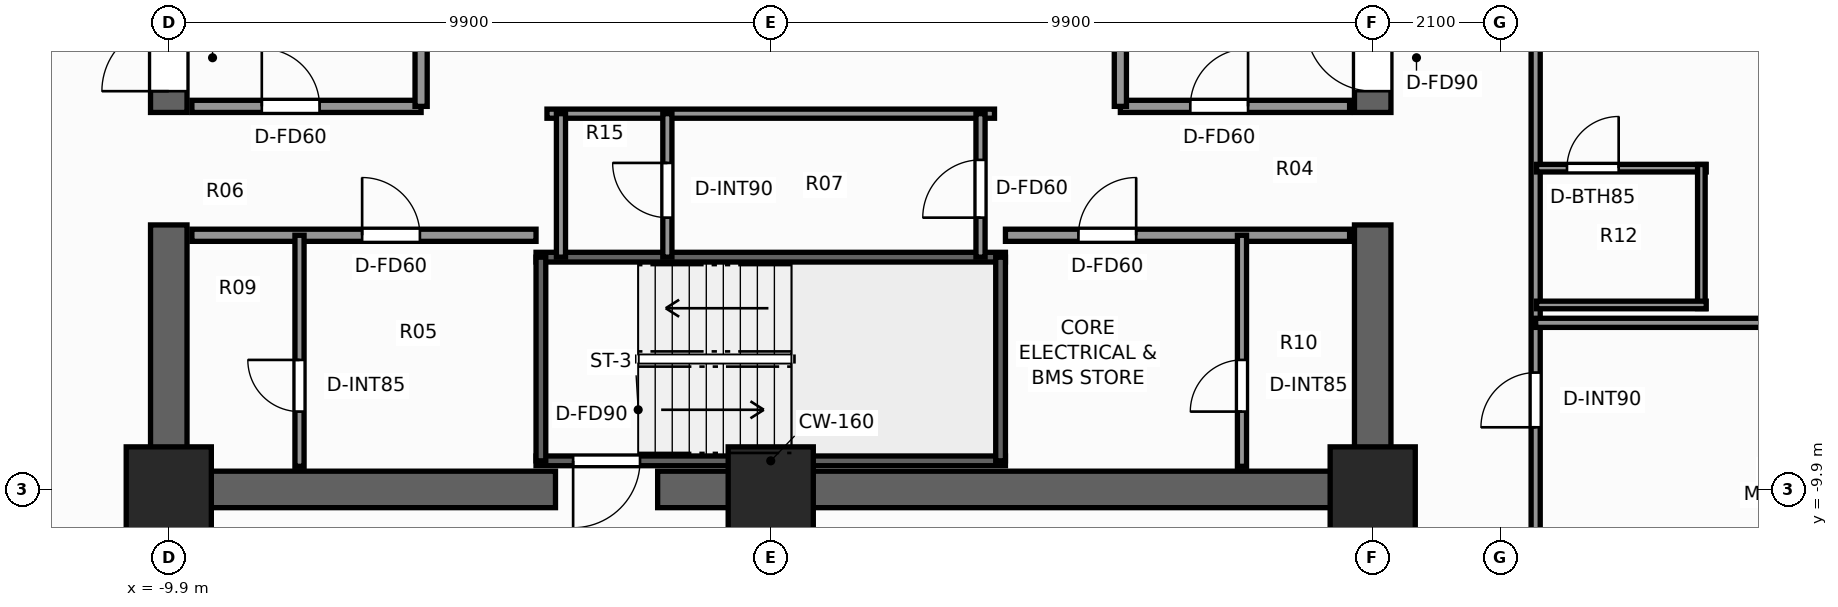
"""IFC4 building model, lengths in metres.
Left out: names, types, materials, properties, quantities, classifications, styles, units other than length and angle.
Written with IfcOpenShell. Run it as: python <this file> out.ifc"""

import sys

from ifc_helpers import new_model, si_unit, direction, frame, frame_2d, origin, origin_2d, place, context, subcontext, project, spatial, rectangle, extrude, element, fill, save


model = new_model("IFC4")
c1 = context("Model", 3, precision=1e-05, world=origin(), true_north=direction((0.0, 1.0)))
c2 = subcontext(c1, "Body", "Model", "MODEL_VIEW")
j1 = project(units=[si_unit("LENGTHUNIT", "METRE"), si_unit("PLANEANGLEUNIT", "RADIAN")], contexts=[c1])
p1 = place(None, origin())
s1 = spatial("IfcSite", under=j1, at=p1, CompositionType="ELEMENT")
p2 = place(p1, origin())
s2 = spatial("IfcBuilding", under=s1, at=p2, CompositionType="ELEMENT")
p3 = place(p2, frame((0.0, 0.0, 53.5)))
s3 = spatial("IfcBuildingStorey", under=s2, at=p3, CompositionType="ELEMENT", Elevation=53.5)
p4 = place(p3, frame((10.2, -9.9, 0.0), z_axis=(0.0, 0.0, 1.0), x_axis=(-1.0, 0.0, 0.0)))
e1 = element("IfcWall", 1, at=p4, inside=s3, PredefinedType="SHEAR", context=c2, shape_type="SweptSolid", body=[
    extrude(rectangle(XDim=12.06, YDim=0.6, at=frame_2d((6.03, 0.0))), origin(), (0.0, 0.0, 1.0), 3.3),
])
p5 = place(p3, frame((-3.54, -9.9, 0.0), z_axis=(0.0, 0.0, 1.0), x_axis=(-1.0, 0.0, 0.0)))
e2 = element("IfcWall", 2, at=p5, inside=s3, PredefinedType="SHEAR", context=c2, shape_type="SweptSolid", body=[
    extrude(rectangle(XDim=6.66, YDim=0.6, at=frame_2d((3.33, 0.0))), origin(), (0.0, 0.0, 1.0), 3.3),
])
for number, where, z_axis, x_axis in (
    (3, (-9.9, -9.6, 0.0), (0.0, 0.0, 1.0), (0.0, 1.0, 0.0)),
    (4, (9.9, -9.6, 0.0), (0.0, 0.0, 1.0), (0.0, 1.0, 0.0)),
):
    element("IfcWall", number, at=place(p3, frame(where, z_axis=z_axis, x_axis=x_axis)), inside=s3, PredefinedType="SHEAR", context=c2, shape_type="SweptSolid", body=[
        extrude(rectangle(XDim=4.05, YDim=0.6, at=frame_2d((2.025, 0.0))), origin(), (0.0, 0.0, 1.0), 3.3),
    ])
p6 = place(p3, frame((-9.9, -3.7, 0.0), z_axis=(0.0, 0.0, 1.0), x_axis=(0.0, 1.0, 0.0)))
e5 = element("IfcWall", 5, at=p6, inside=s3, PredefinedType="SHEAR", context=c2, shape_type="SweptSolid", body=[
    extrude(rectangle(XDim=13.3, YDim=0.6, at=frame_2d((6.65, 0.0))), origin(), (0.0, 0.0, 1.0), 3.3),
])
p7 = place(p6, frame((0.35, 0.0, 0.0)))
e6 = element("IfcOpeningElement", 6, at=p7, cuts=e5, PredefinedType="OPENING", context=c2, shape_type="SweptSolid", body=[
    extrude(rectangle(XDim=1.1, YDim=2.2, at=frame_2d((0.55, 1.1))), frame((0.0, 0.31, 0.0), z_axis=(0.0, -1.0, 0.0), x_axis=(1.0, 0.0, 0.0)), (0.0, 0.0, 1.0), 0.62),
])
p8 = place(p3, frame((9.9, -3.7, 0.0), z_axis=(0.0, 0.0, 1.0), x_axis=(0.0, 1.0, 0.0)))
e7 = element("IfcWall", 7, at=p8, inside=s3, PredefinedType="SHEAR", context=c2, shape_type="SweptSolid", body=[
    extrude(rectangle(XDim=13.3, YDim=0.6, at=frame_2d((6.65, 0.0))), origin(), (0.0, 0.0, 1.0), 3.3),
])
p9 = place(p8, frame((0.35, 0.0, 0.0)))
e8 = element("IfcOpeningElement", 8, at=p9, cuts=e7, PredefinedType="OPENING", context=c2, shape_type="SweptSolid", body=[
    extrude(rectangle(XDim=1.1, YDim=2.2, at=frame_2d((0.55, 1.1))), frame((0.0, 0.31, 0.0), z_axis=(0.0, -1.0, 0.0), x_axis=(1.0, 0.0, 0.0)), (0.0, 0.0, 1.0), 0.62),
])
for number, where, z_axis, x_axis in (
    (9, (-9.9, -9.9, 0.0), (0.0, 0.0, 1.0), (1.0, 0.0, 0.0)),
    (10, (9.9, -9.9, 0.0), (0.0, 0.0, 1.0), (1.0, 0.0, 0.0)),
    (11, (0.0, -9.9, 0.0), (0.0, 0.0, 1.0), (1.0, 0.0, 0.0)),
):
    element("IfcColumn", number, at=place(p3, frame(where, z_axis=z_axis, x_axis=x_axis)), inside=s3, PredefinedType="COLUMN", context=c2, shape_type="SweptSolid", body=[
        extrude(rectangle(XDim=1.4, YDim=1.4, at=origin_2d()), origin(), (0.0, 0.0, 1.0), 3.3),
    ])
p10 = place(p3, frame((3.86, -9.43, 0.0), z_axis=(0.0, 0.0, 1.0), x_axis=(-1.0, 0.0, 0.0)))
e12 = element("IfcWall", 12, at=p10, inside=s3, PredefinedType="SHEAR", context=c2, shape_type="SweptSolid", body=[
    extrude(rectangle(XDim=7.72, YDim=0.16, at=frame_2d((3.86, 0.0))), origin(), (0.0, 0.0, 1.0), 3.3),
])
p11 = place(p10, frame((6.01, 0.0, 0.0)))
e13 = element("IfcOpeningElement", 13, at=p11, cuts=e12, PredefinedType="OPENING", context=c2, shape_type="SweptSolid", body=[
    extrude(rectangle(XDim=1.1, YDim=2.2, at=frame_2d((0.55, 1.1))), frame((0.0, 0.09, 0.0), z_axis=(0.0, -1.0, 0.0), x_axis=(1.0, 0.0, 0.0)), (0.0, 0.0, 1.0), 0.18),
])
p12 = place(p3, frame((-3.86, -6.08, 0.0), z_axis=(0.0, 0.0, 1.0), x_axis=(1.0, 0.0, 0.0)))
e14 = element("IfcWall", 14, at=p12, inside=s3, PredefinedType="SHEAR", context=c2, shape_type="SweptSolid", body=[
    extrude(rectangle(XDim=7.72, YDim=0.16, at=frame_2d((3.86, 0.0))), origin(), (0.0, 0.0, 1.0), 3.3),
])
for number, where, z_axis, x_axis in (
    (15, (-3.78, -9.43, 0.0), (0.0, 0.0, 1.0), (0.0, 1.0, 0.0)),
    (16, (3.78, -9.43, 0.0), (0.0, 0.0, 1.0), (0.0, 1.0, 0.0)),
):
    element("IfcWall", number, at=place(p3, frame(where, z_axis=z_axis, x_axis=x_axis)), inside=s3, PredefinedType="SHEAR", context=c2, shape_type="SweptSolid", body=[
        extrude(rectangle(XDim=3.35, YDim=0.16, at=frame_2d((1.675, 0.0))), origin(), (0.0, 0.0, 1.0), 3.3),
    ])
p13 = place(p3, frame((-9.52, -3.6, 0.0), z_axis=(0.0, 0.0, 1.0), x_axis=(1.0, 0.0, 0.0)))
e17 = element("IfcWall", 17, at=p13, inside=s3, PredefinedType="SOLIDWALL", context=c2, shape_type="SweptSolid", body=[
    extrude(rectangle(XDim=3.77, YDim=0.2, at=frame_2d((1.885, 0.0))), origin(), (0.0, 0.0, 1.0), 3.06),
])
p14 = place(p13, frame((1.15, 0.0, 0.0)))
e18 = element("IfcOpeningElement", 18, at=p14, cuts=e17, PredefinedType="OPENING", context=c2, shape_type="SweptSolid", body=[
    extrude(rectangle(XDim=0.95, YDim=2.06, at=frame_2d((0.475, 1.03))), frame((0.0, 0.11, 0.0), z_axis=(0.0, -1.0, 0.0), x_axis=(1.0, 0.0, 0.0)), (0.0, 0.0, 1.0), 0.22),
])
p15 = place(p3, frame((-5.75, -3.6, 0.0), z_axis=(0.0, 0.0, 1.0), x_axis=(0.0, 1.0, 0.0)))
e19 = element("IfcWall", 19, at=p15, inside=s3, PredefinedType="SOLIDWALL", context=c2, shape_type="SweptSolid", body=[
    extrude(rectangle(XDim=5.57, YDim=0.2, at=frame_2d((2.785, 0.0))), origin(), (0.0, 0.0, 1.0), 3.06),
])
p16 = place(p15, frame((2.75, 0.0, 0.0)))
e20 = element("IfcOpeningElement", 20, at=p16, cuts=e19, PredefinedType="OPENING", context=c2, shape_type="SweptSolid", body=[
    extrude(rectangle(XDim=1.1, YDim=2.2, at=frame_2d((0.55, 1.1))), frame((0.0, 0.11, 0.0), z_axis=(0.0, -1.0, 0.0), x_axis=(1.0, 0.0, 0.0)), (0.0, 0.0, 1.0), 0.22),
])
p17 = place(p3, frame((5.75, -3.6, 0.0), z_axis=(0.0, 0.0, 1.0), x_axis=(1.0, 0.0, 0.0)))
e21 = element("IfcWall", 21, at=p17, inside=s3, PredefinedType="SOLIDWALL", context=c2, shape_type="SweptSolid", body=[
    extrude(rectangle(XDim=3.77, YDim=0.2, at=frame_2d((1.885, 0.0))), origin(), (0.0, 0.0, 1.0), 3.06),
])
p18 = place(p17, frame((1.15, 0.0, 0.0)))
e22 = element("IfcOpeningElement", 22, at=p18, cuts=e21, PredefinedType="OPENING", context=c2, shape_type="SweptSolid", body=[
    extrude(rectangle(XDim=0.95, YDim=2.06, at=frame_2d((0.475, 1.03))), frame((0.0, 0.11, 0.0), z_axis=(0.0, -1.0, 0.0), x_axis=(1.0, 0.0, 0.0)), (0.0, 0.0, 1.0), 0.22),
])
p19 = place(p3, frame((5.75, -3.6, 0.0), z_axis=(0.0, 0.0, 1.0), x_axis=(0.0, 1.0, 0.0)))
e23 = element("IfcWall", 23, at=p19, inside=s3, PredefinedType="SOLIDWALL", context=c2, shape_type="SweptSolid", body=[
    extrude(rectangle(XDim=5.57, YDim=0.2, at=frame_2d((2.785, 0.0))), origin(), (0.0, 0.0, 1.0), 3.06),
])
p20 = place(p19, frame((2.75, 0.0, 0.0)))
e24 = element("IfcOpeningElement", 24, at=p20, cuts=e23, PredefinedType="OPENING", context=c2, shape_type="SweptSolid", body=[
    extrude(rectangle(XDim=1.1, YDim=2.2, at=frame_2d((0.55, 1.1))), frame((0.0, 0.11, 0.0), z_axis=(0.0, -1.0, 0.0), x_axis=(1.0, 0.0, 0.0)), (0.0, 0.0, 1.0), 0.22),
])
p21 = place(p3, frame((-9.52, -5.72, 0.0), z_axis=(0.0, 0.0, 1.0), x_axis=(1.0, 0.0, 0.0)))
e25 = element("IfcWall", 25, at=p21, inside=s3, PredefinedType="SOLIDWALL", context=c2, shape_type="SweptSolid", body=[
    extrude(rectangle(XDim=5.66, YDim=0.2, at=frame_2d((2.83, 0.0))), origin(), (0.0, 0.0, 1.0), 3.06),
])
p22 = place(p21, frame((2.8, 0.0, 0.0)))
e26 = element("IfcOpeningElement", 26, at=p22, cuts=e25, PredefinedType="OPENING", context=c2, shape_type="SweptSolid", body=[
    extrude(rectangle(XDim=0.95, YDim=2.06, at=frame_2d((0.475, 1.03))), frame((0.0, 0.11, 0.0), z_axis=(0.0, -1.0, 0.0), x_axis=(1.0, 0.0, 0.0)), (0.0, 0.0, 1.0), 0.22),
])
p23 = place(p3, frame((-7.75, -9.52, 0.0), z_axis=(0.0, 0.0, 1.0), x_axis=(0.0, 1.0, 0.0)))
e27 = element("IfcWall", 27, at=p23, inside=s3, PredefinedType="PARTITIONING", context=c2, shape_type="SweptSolid", body=[
    extrude(rectangle(XDim=3.8, YDim=0.15, at=frame_2d((1.9, 0.0))), origin(), (0.0, 0.0, 1.0), 3.06),
])
p24 = place(p23, frame((0.9, 0.0, 0.0)))
e28 = element("IfcOpeningElement", 28, at=p24, cuts=e27, PredefinedType="OPENING", context=c2, shape_type="SweptSolid", body=[
    extrude(rectangle(XDim=0.85, YDim=2.03, at=frame_2d((0.425, 1.015))), frame((0.0, 0.085, 0.0), z_axis=(0.0, -1.0, 0.0), x_axis=(1.0, 0.0, 0.0)), (0.0, 0.0, 1.0), 0.17),
])
p25 = place(p3, frame((3.86, -5.72, 0.0), z_axis=(0.0, 0.0, 1.0), x_axis=(1.0, 0.0, 0.0)))
e29 = element("IfcWall", 29, at=p25, inside=s3, PredefinedType="SOLIDWALL", context=c2, shape_type="SweptSolid", body=[
    extrude(rectangle(XDim=5.66, YDim=0.2, at=frame_2d((2.83, 0.0))), origin(), (0.0, 0.0, 1.0), 3.06),
])
p26 = place(p25, frame((1.2, 0.0, 0.0)))
e30 = element("IfcOpeningElement", 30, at=p26, cuts=e29, PredefinedType="OPENING", context=c2, shape_type="SweptSolid", body=[
    extrude(rectangle(XDim=0.95, YDim=2.06, at=frame_2d((0.475, 1.03))), frame((0.0, 0.11, 0.0), z_axis=(0.0, -1.0, 0.0), x_axis=(1.0, 0.0, 0.0)), (0.0, 0.0, 1.0), 0.22),
])
p27 = place(p3, frame((7.75, -9.52, 0.0), z_axis=(0.0, 0.0, 1.0), x_axis=(0.0, 1.0, 0.0)))
e31 = element("IfcWall", 31, at=p27, inside=s3, PredefinedType="PARTITIONING", context=c2, shape_type="SweptSolid", body=[
    extrude(rectangle(XDim=3.8, YDim=0.15, at=frame_2d((1.9, 0.0))), origin(), (0.0, 0.0, 1.0), 3.06),
])
p28 = place(p27, frame((0.9, 0.0, 0.0)))
e32 = element("IfcOpeningElement", 32, at=p28, cuts=e31, PredefinedType="OPENING", context=c2, shape_type="SweptSolid", body=[
    extrude(rectangle(XDim=0.85, YDim=2.03, at=frame_2d((0.425, 1.015))), frame((0.0, 0.085, 0.0), z_axis=(0.0, -1.0, 0.0), x_axis=(1.0, 0.0, 0.0)), (0.0, 0.0, 1.0), 0.17),
])
p29 = place(p3, frame((-3.68, -3.72, 0.0), z_axis=(0.0, 0.0, 1.0), x_axis=(1.0, 0.0, 0.0)))
e33 = element("IfcWall", 33, at=p29, inside=s3, PredefinedType="PARTITIONING", context=c2, shape_type="SweptSolid", body=[
    extrude(rectangle(XDim=7.36, YDim=0.15, at=frame_2d((3.68, 0.0))), origin(), (0.0, 0.0, 1.0), 3.06),
])
p30 = place(p3, frame((3.45, -6.08, 0.0), z_axis=(0.0, 0.0, 1.0), x_axis=(0.0, 1.0, 0.0)))
e34 = element("IfcWall", 34, at=p30, inside=s3, PredefinedType="PARTITIONING", context=c2, shape_type="SweptSolid", body=[
    extrude(rectangle(XDim=2.36, YDim=0.15, at=frame_2d((1.18, 0.0))), origin(), (0.0, 0.0, 1.0), 3.06),
])
p31 = place(p30, frame((0.65, 0.0, 0.0)))
e35 = element("IfcOpeningElement", 35, at=p31, cuts=e34, PredefinedType="OPENING", context=c2, shape_type="SweptSolid", body=[
    extrude(rectangle(XDim=0.95, YDim=2.06, at=frame_2d((0.475, 1.03))), frame((0.0, 0.085, 0.0), z_axis=(0.0, -1.0, 0.0), x_axis=(1.0, 0.0, 0.0)), (0.0, 0.0, 1.0), 0.17),
])
p32 = place(p3, frame((-3.45, -6.08, 0.0), z_axis=(0.0, 0.0, 1.0), x_axis=(0.0, 1.0, 0.0)))
e36 = element("IfcWall", 36, at=p32, inside=s3, PredefinedType="PARTITIONING", context=c2, shape_type="SweptSolid", body=[
    extrude(rectangle(XDim=2.36, YDim=0.15, at=frame_2d((1.18, 0.0))), origin(), (0.0, 0.0, 1.0), 3.06),
])
p33 = place(p3, frame((-1.7, -6.08, 0.0), z_axis=(0.0, 0.0, 1.0), x_axis=(0.0, 1.0, 0.0)))
e37 = element("IfcWall", 37, at=p33, inside=s3, PredefinedType="PARTITIONING", context=c2, shape_type="SweptSolid", body=[
    extrude(rectangle(XDim=2.36, YDim=0.15, at=frame_2d((1.18, 0.0))), origin(), (0.0, 0.0, 1.0), 3.06),
])
p34 = place(p33, frame((0.65, 0.0, 0.0)))
e38 = element("IfcOpeningElement", 38, at=p34, cuts=e37, PredefinedType="OPENING", context=c2, shape_type="SweptSolid", body=[
    extrude(rectangle(XDim=0.9, YDim=2.06, at=frame_2d((0.45, 1.03))), frame((0.0, 0.085, 0.0), z_axis=(0.0, -1.0, 0.0), x_axis=(1.0, 0.0, 0.0)), (0.0, 0.0, 1.0), 0.17),
])
p35 = place(p3, frame((12.58, -12.42, 0.0), z_axis=(0.0, 0.0, 1.0), x_axis=(0.0, 1.0, 0.0)))
e39 = element("IfcWall", 39, at=p35, inside=s3, PredefinedType="PARTITIONING", context=c2, shape_type="SweptSolid", body=[
    extrude(rectangle(XDim=24.84, YDim=0.15, at=frame_2d((12.42, 0.0))), origin(), (0.0, 0.0, 1.0), 2.272),
])
p36 = place(p35, frame((3.542, 0.0, 0.0)))
e40 = element("IfcOpeningElement", 40, at=p36, cuts=e39, PredefinedType="OPENING", context=c2, shape_type="SweptSolid", body=[
    extrude(rectangle(XDim=0.9, YDim=2.06, at=frame_2d((0.45, 1.03))), frame((0.0, 0.085, 0.0), z_axis=(0.0, -1.0, 0.0), x_axis=(1.0, 0.0, 0.0)), (0.0, 0.0, 1.0), 0.17),
])
p37 = place(p35, frame((9.915, 0.0, 0.0)))
e41 = element("IfcOpeningElement", 41, at=p37, cuts=e39, PredefinedType="OPENING", context=c2, shape_type="SweptSolid", body=[
    extrude(rectangle(XDim=0.95, YDim=2.06, at=frame_2d((0.475, 1.03))), frame((0.0, 0.085, 0.0), z_axis=(0.0, -1.0, 0.0), x_axis=(1.0, 0.0, 0.0)), (0.0, 0.0, 1.0), 0.17),
])
p38 = place(p35, frame((19.505, 0.0, 0.0)))
e42 = element("IfcOpeningElement", 42, at=p38, cuts=e39, PredefinedType="OPENING", context=c2, shape_type="SweptSolid", body=[
    extrude(rectangle(XDim=0.9, YDim=2.06, at=frame_2d((0.45, 1.03))), frame((0.0, 0.085, 0.0), z_axis=(0.0, -1.0, 0.0), x_axis=(1.0, 0.0, 0.0)), (0.0, 0.0, 1.0), 0.17),
])
p39 = place(p3, frame((12.58, -7.16, 0.0), z_axis=(0.0, 0.0, 1.0), x_axis=(1.0, 0.0, 0.0)))
e43 = element("IfcWall", 43, at=p39, inside=s3, PredefinedType="PARTITIONING", context=c2, shape_type="SweptSolid", body=[
    extrude(rectangle(XDim=9.4, YDim=0.15, at=frame_2d((4.7, 0.0))), origin(), (0.0, 0.0, 1.0), 2.429),
])
p40 = place(p3, frame((12.595, -4.616, 0.0), z_axis=(0.0, 0.0, 1.0), x_axis=(1.0, 0.0, 0.0)))
e44 = element("IfcWall", 44, at=p40, inside=s3, PredefinedType="PARTITIONING", context=c2, shape_type="SweptSolid", body=[
    extrude(rectangle(XDim=2.79, YDim=0.125, at=frame_2d((1.395, 0.0))), origin(), (0.0, 0.0, 1.0), 2.272),
])
p41 = place(p40, frame((0.5, 0.0, 0.0)))
e45 = element("IfcOpeningElement", 45, at=p41, cuts=e44, PredefinedType="OPENING", context=c2, shape_type="SweptSolid", body=[
    extrude(rectangle(XDim=0.85, YDim=2.03, at=frame_2d((0.425, 1.015))), frame((0.0, 0.073, 0.0), z_axis=(0.0, -1.0, 0.0), x_axis=(1.0, 0.0, 0.0)), (0.0, 0.0, 1.0), 0.145),
])
p42 = place(p3, frame((15.305, -6.926, 0.0), z_axis=(0.0, 0.0, 1.0), x_axis=(0.0, 1.0, 0.0)))
e46 = element("IfcWall", 46, at=p42, inside=s3, PredefinedType="PARTITIONING", context=c2, shape_type="SweptSolid", body=[
    extrude(rectangle(XDim=2.37, YDim=0.125, at=frame_2d((1.185, 0.0))), origin(), (0.0, 0.0, 1.0), 2.272),
])
p43 = place(p3, frame((12.595, -6.866, 0.0), z_axis=(0.0, 0.0, 1.0), x_axis=(1.0, 0.0, 0.0)))
e47 = element("IfcWall", 47, at=p43, inside=s3, PredefinedType="PARTITIONING", context=c2, shape_type="SweptSolid", body=[
    extrude(rectangle(XDim=2.79, YDim=0.125, at=frame_2d((1.395, 0.0))), origin(), (0.0, 0.0, 1.0), 3.06),
])
p44 = place(p11, origin())
e48 = element("IfcDoor", 48, at=p44, inside=s3, OperationType="SINGLE_SWING_RIGHT", PredefinedType="DOOR", context=c2, shape_type="SweptSolid", body=[
    extrude(rectangle(XDim=1.1, YDim=2.2, at=frame_2d((0.55, 1.1))), frame((0.0, 0.025, 0.0), z_axis=(0.0, -1.0, 0.0), x_axis=(1.0, 0.0, 0.0)), (0.0, 0.0, 1.0), 0.05),
])
fill(e13, e48)
p45 = place(p7, origin())
e49 = element("IfcDoor", 49, at=p45, inside=s3, OperationType="SINGLE_SWING_LEFT", PredefinedType="DOOR", context=c2, shape_type="SweptSolid", body=[
    extrude(rectangle(XDim=1.1, YDim=2.2, at=frame_2d((0.55, 1.1))), frame((0.0, 0.025, 0.0), z_axis=(0.0, -1.0, 0.0), x_axis=(1.0, 0.0, 0.0)), (0.0, 0.0, 1.0), 0.05),
])
fill(e6, e49)
p46 = place(p9, origin())
e50 = element("IfcDoor", 50, at=p46, inside=s3, OperationType="SINGLE_SWING_RIGHT", PredefinedType="DOOR", context=c2, shape_type="SweptSolid", body=[
    extrude(rectangle(XDim=1.1, YDim=2.2, at=frame_2d((0.55, 1.1))), frame((0.0, 0.025, 0.0), z_axis=(0.0, -1.0, 0.0), x_axis=(1.0, 0.0, 0.0)), (0.0, 0.0, 1.0), 0.05),
])
fill(e8, e50)
p47 = place(p22, origin())
e51 = element("IfcDoor", 51, at=p47, inside=s3, OperationType="SINGLE_SWING_LEFT", PredefinedType="DOOR", context=c2, shape_type="SweptSolid", body=[
    extrude(rectangle(XDim=0.95, YDim=2.06, at=frame_2d((0.475, 1.03))), frame((0.0, 0.025, 0.0), z_axis=(0.0, -1.0, 0.0), x_axis=(1.0, 0.0, 0.0)), (0.0, 0.0, 1.0), 0.05),
])
fill(e26, e51)
p48 = place(p24, origin())
e52 = element("IfcDoor", 52, at=p48, inside=s3, OperationType="SINGLE_SWING_RIGHT", PredefinedType="DOOR", context=c2, shape_type="SweptSolid", body=[
    extrude(rectangle(XDim=0.85, YDim=2.03, at=frame_2d((0.425, 1.015))), frame((0.0, 0.025, 0.0), z_axis=(0.0, -1.0, 0.0), x_axis=(1.0, 0.0, 0.0)), (0.0, 0.0, 1.0), 0.05),
])
fill(e28, e52)
p49 = place(p14, origin())
e53 = element("IfcDoor", 53, at=p49, inside=s3, OperationType="SINGLE_SWING_LEFT", PredefinedType="DOOR", context=c2, shape_type="SweptSolid", body=[
    extrude(rectangle(XDim=0.95, YDim=2.06, at=frame_2d((0.475, 1.03))), frame((0.0, 0.025, 0.0), z_axis=(0.0, -1.0, 0.0), x_axis=(1.0, 0.0, 0.0)), (0.0, 0.0, 1.0), 0.05),
])
fill(e18, e53)
p50 = place(p26, origin())
e54 = element("IfcDoor", 54, at=p50, inside=s3, OperationType="SINGLE_SWING_RIGHT", PredefinedType="DOOR", context=c2, shape_type="SweptSolid", body=[
    extrude(rectangle(XDim=0.95, YDim=2.06, at=frame_2d((0.475, 1.03))), frame((0.0, 0.025, 0.0), z_axis=(0.0, -1.0, 0.0), x_axis=(1.0, 0.0, 0.0)), (0.0, 0.0, 1.0), 0.05),
])
fill(e30, e54)
p51 = place(p28, origin())
e55 = element("IfcDoor", 55, at=p51, inside=s3, OperationType="SINGLE_SWING_LEFT", PredefinedType="DOOR", context=c2, shape_type="SweptSolid", body=[
    extrude(rectangle(XDim=0.85, YDim=2.03, at=frame_2d((0.425, 1.015))), frame((0.0, 0.025, 0.0), z_axis=(0.0, -1.0, 0.0), x_axis=(1.0, 0.0, 0.0)), (0.0, 0.0, 1.0), 0.05),
])
fill(e32, e55)
p52 = place(p18, origin())
e56 = element("IfcDoor", 56, at=p52, inside=s3, OperationType="SINGLE_SWING_RIGHT", PredefinedType="DOOR", context=c2, shape_type="SweptSolid", body=[
    extrude(rectangle(XDim=0.95, YDim=2.06, at=frame_2d((0.475, 1.03))), frame((0.0, 0.025, 0.0), z_axis=(0.0, -1.0, 0.0), x_axis=(1.0, 0.0, 0.0)), (0.0, 0.0, 1.0), 0.05),
])
fill(e22, e56)
p53 = place(p31, origin())
e57 = element("IfcDoor", 57, at=p53, inside=s3, OperationType="SINGLE_SWING_LEFT", PredefinedType="DOOR", context=c2, shape_type="SweptSolid", body=[
    extrude(rectangle(XDim=0.95, YDim=2.06, at=frame_2d((0.475, 1.03))), frame((0.0, 0.025, 0.0), z_axis=(0.0, -1.0, 0.0), x_axis=(1.0, 0.0, 0.0)), (0.0, 0.0, 1.0), 0.05),
])
fill(e35, e57)
p54 = place(p34, origin())
e58 = element("IfcDoor", 58, at=p54, inside=s3, OperationType="SINGLE_SWING_RIGHT", PredefinedType="DOOR", context=c2, shape_type="SweptSolid", body=[
    extrude(rectangle(XDim=0.9, YDim=2.06, at=frame_2d((0.45, 1.03))), frame((0.0, 0.025, 0.0), z_axis=(0.0, -1.0, 0.0), x_axis=(1.0, 0.0, 0.0)), (0.0, 0.0, 1.0), 0.05),
])
fill(e38, e58)
p55 = place(p36, origin())
e59 = element("IfcDoor", 59, at=p55, inside=s3, OperationType="SINGLE_SWING_LEFT", PredefinedType="DOOR", context=c2, shape_type="SweptSolid", body=[
    extrude(rectangle(XDim=0.9, YDim=2.06, at=frame_2d((0.45, 1.03))), frame((0.0, 0.025, 0.0), z_axis=(0.0, -1.0, 0.0), x_axis=(1.0, 0.0, 0.0)), (0.0, 0.0, 1.0), 0.05),
])
fill(e40, e59)
p56 = place(p41, origin())
e60 = element("IfcDoor", 60, at=p56, inside=s3, OperationType="SINGLE_SWING_RIGHT", PredefinedType="DOOR", context=c2, shape_type="SweptSolid", body=[
    extrude(rectangle(XDim=0.85, YDim=2.03, at=frame_2d((0.425, 1.015))), frame((0.0, 0.025, 0.0), z_axis=(0.0, -1.0, 0.0), x_axis=(1.0, 0.0, 0.0)), (0.0, 0.0, 1.0), 0.05),
])
fill(e45, e60)
save(model, sys.argv[1])
